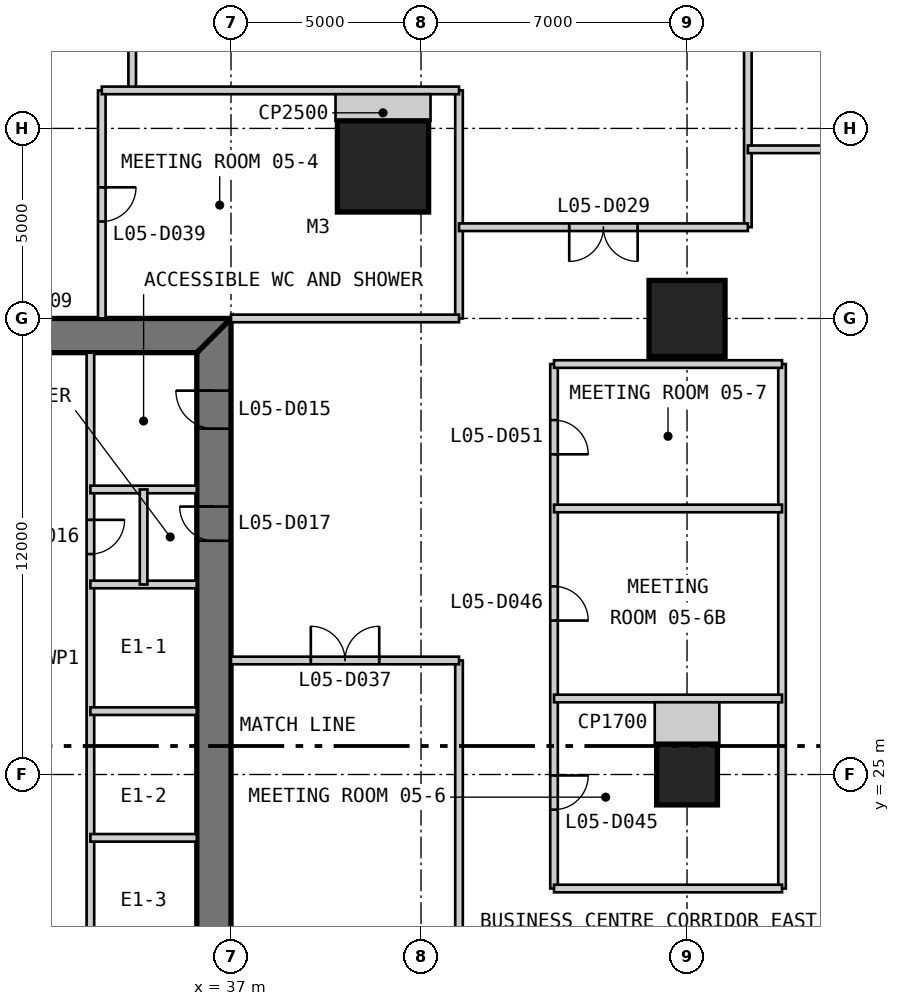
"""IFC4 building model, lengths in metres.
Left out: names, types, materials, properties, quantities, classifications, styles, units other than length and angle.
Written with IfcOpenShell. Run it as: python <this file> out.ifc"""

import sys

from ifc_helpers import new_model, si_unit, direction, frame, frame_2d, origin, origin_2d, place, context, subcontext, project, spatial, polyline, rectangle, outline, extrude, element, fill, save


model = new_model("IFC4")
c1 = context("Model", 3, precision=1e-05, world=origin(), true_north=direction((0.0, 1.0)))
c2 = subcontext(c1, "Body", "Model", "MODEL_VIEW")
j1 = project(units=[si_unit("LENGTHUNIT", "METRE"), si_unit("PLANEANGLEUNIT", "RADIAN")], contexts=[c1])
p1 = place(None, origin())
s1 = spatial("IfcSite", under=j1, at=p1, CompositionType="ELEMENT")
p2 = place(p1, origin())
s2 = spatial("IfcBuilding", under=s1, at=p2, CompositionType="ELEMENT")
p3 = place(p2, frame((0.0, 0.0, 26.2)))
s3 = spatial("IfcBuildingStorey", under=s2, at=p3, CompositionType="ELEMENT", Elevation=26.2)
p4 = place(p3, frame((41.0, 41.0, 0.0), z_axis=(0.0, 0.0, 1.0), x_axis=(1.0, 0.0, 0.0)))
e1 = element("IfcColumn", 1, at=p4, inside=s3, PredefinedType="COLUMN", context=c2, shape_type="SweptSolid", body=[
    extrude(rectangle(XDim=2.4, YDim=2.4, at=origin_2d()), origin(), (0.0, 0.0, 1.0), 4.8),
])
p5 = place(p3, frame((49.0, 25.0, 0.0), z_axis=(0.0, 0.0, 1.0), x_axis=(1.0, 0.0, 0.0)))
e2 = element("IfcColumn", 2, at=p5, inside=s3, PredefinedType="COLUMN", context=c2, shape_type="SweptSolid", body=[
    extrude(rectangle(XDim=1.6, YDim=1.6, at=origin_2d()), origin(), (0.0, 0.0, 1.0), 4.8),
])
p6 = place(p3, frame((49.0, 37.0, 0.0), z_axis=(0.0, 0.0, 1.0), x_axis=(1.0, 0.0, 0.0)))
e3 = element("IfcColumn", 3, at=p6, inside=s3, PredefinedType="COLUMN", context=c2, shape_type="SweptSolid", body=[
    extrude(rectangle(XDim=2.0, YDim=2.0, at=origin_2d()), origin(), (0.0, 0.0, 1.0), 4.8),
])
p7 = place(p3, frame((36.55, 13.9, 0.0), z_axis=(0.0, 0.0, 1.0), x_axis=(0.0, 1.0, 0.0)))
e4 = element("IfcWall", 4, at=p7, inside=s3, PredefinedType="SHEAR", context=c2, shape_type="SweptSolid", body=[
    extrude(outline(polyline([(-0.9, -0.45), (23.1, -0.45), (22.2, 0.45), (0.0, 0.45), (-0.9, -0.45)])), origin(), (0.0, 0.0, 1.0), 4.8),
])
p8 = place(p7, frame((20.2, 0.0, 0.0)))
e5 = element("IfcOpeningElement", 5, at=p8, cuts=e4, PredefinedType="OPENING", context=c2, shape_type="SweptSolid", body=[
    extrude(rectangle(XDim=1.0, YDim=2.2, at=frame_2d((0.5, 1.1))), frame((0.0, 0.46, 0.0), z_axis=(0.0, -1.0, 0.0), x_axis=(1.0, 0.0, 0.0)), (0.0, 0.0, 1.0), 0.92),
])
p9 = place(p7, frame((17.25, 0.0, 0.0)))
e6 = element("IfcOpeningElement", 6, at=p9, cuts=e4, PredefinedType="OPENING", context=c2, shape_type="SweptSolid", body=[
    extrude(rectangle(XDim=0.9, YDim=2.2, at=frame_2d((0.45, 1.1))), frame((0.0, 0.46, 0.0), z_axis=(0.0, -1.0, 0.0), x_axis=(1.0, 0.0, 0.0)), (0.0, 0.0, 1.0), 0.92),
])
p10 = place(p3, frame((37.0, 36.55, 0.0), z_axis=(0.0, 0.0, 1.0), x_axis=(-1.0, 0.0, 0.0)))
e7 = element("IfcWall", 7, at=p10, inside=s3, PredefinedType="SHEAR", context=c2, shape_type="SweptSolid", body=[
    extrude(outline(polyline([(0.0, -0.45), (24.0, -0.45), (23.1, 0.45), (0.9, 0.45), (0.0, -0.45)])), origin(), (0.0, 0.0, 1.0), 4.8),
])
p11 = place(p10, frame((4.9, 0.0, 0.0)))
e8 = element("IfcOpeningElement", 8, at=p11, cuts=e7, PredefinedType="OPENING", context=c2, shape_type="SweptSolid", body=[
    extrude(rectangle(XDim=1.0, YDim=2.2, at=frame_2d((0.5, 1.1))), frame((0.0, 0.46, 0.0), z_axis=(0.0, -1.0, 0.0), x_axis=(1.0, 0.0, 0.0)), (0.0, 0.0, 1.0), 0.92),
])
p12 = place(p10, frame((8.9, 0.0, 0.0)))
e9 = element("IfcOpeningElement", 9, at=p12, cuts=e7, PredefinedType="OPENING", context=c2, shape_type="SweptSolid", body=[
    extrude(rectangle(XDim=1.1, YDim=2.2, at=frame_2d((0.55, 1.1))), frame((0.0, 0.46, 0.0), z_axis=(0.0, -1.0, 0.0), x_axis=(1.0, 0.0, 0.0)), (0.0, 0.0, 1.0), 0.92),
])
p13 = place(p10, frame((15.05, 0.0, 0.0)))
e10 = element("IfcOpeningElement", 10, at=p13, cuts=e7, PredefinedType="OPENING", context=c2, shape_type="SweptSolid", body=[
    extrude(rectangle(XDim=0.9, YDim=2.2, at=frame_2d((0.45, 1.1))), frame((0.0, 0.46, 0.0), z_axis=(0.0, -1.0, 0.0), x_axis=(1.0, 0.0, 0.0)), (0.0, 0.0, 1.0), 0.92),
])
p14 = place(p10, frame((17.9, 0.0, 0.0)))
e11 = element("IfcOpeningElement", 11, at=p14, cuts=e7, PredefinedType="OPENING", context=c2, shape_type="SweptSolid", body=[
    extrude(rectangle(XDim=1.0, YDim=2.2, at=frame_2d((0.5, 1.1))), frame((0.0, 0.46, 0.0), z_axis=(0.0, -1.0, 0.0), x_axis=(1.0, 0.0, 0.0)), (0.0, 0.0, 1.0), 0.92),
])
p15 = place(p10, frame((21.4, 0.0, 0.0)))
e12 = element("IfcOpeningElement", 12, at=p15, cuts=e7, PredefinedType="OPENING", context=c2, shape_type="SweptSolid", body=[
    extrude(rectangle(XDim=1.0, YDim=2.2, at=frame_2d((0.5, 1.1))), frame((0.0, 0.46, 0.0), z_axis=(0.0, -1.0, 0.0), x_axis=(1.0, 0.0, 0.0)), (0.0, 0.0, 1.0), 0.92),
])
p16 = place(p3, frame((33.3, 36.1, 0.0), z_axis=(0.0, 0.0, 1.0), x_axis=(0.0, -1.0, 0.0)))
e13 = element("IfcWall", 13, at=p16, inside=s3, PredefinedType="PARTITIONING", context=c2, shape_type="SweptSolid", body=[
    extrude(rectangle(XDim=16.1, YDim=0.2, at=frame_2d((8.05, 0.0))), origin(), (0.0, 0.0, 1.0), 4.6),
])
p17 = place(p16, frame((4.4, 0.0, 0.0)))
e14 = element("IfcOpeningElement", 14, at=p17, cuts=e13, PredefinedType="OPENING", context=c2, shape_type="SweptSolid", body=[
    extrude(rectangle(XDim=0.9, YDim=2.2, at=frame_2d((0.45, 1.1))), frame((0.0, 0.11, 0.0), z_axis=(0.0, -1.0, 0.0), x_axis=(1.0, 0.0, 0.0)), (0.0, 0.0, 1.0), 0.22),
])
for number, where, z_axis, x_axis in (
    (15, (36.1, 30.0, 0.0), (0.0, 0.0, 1.0), (-1.0, 0.0, 0.0)),
    (16, (36.1, 26.667, 0.0), (0.0, 0.0, 1.0), (-1.0, 0.0, 0.0)),
    (17, (36.1, 23.333, 0.0), (0.0, 0.0, 1.0), (-1.0, 0.0, 0.0)),
    (18, (36.1, 32.5, 0.0), (0.0, 0.0, 1.0), (-1.0, 0.0, 0.0)),
):
    element("IfcWall", number, at=place(p3, frame(where, z_axis=z_axis, x_axis=x_axis)), inside=s3, PredefinedType="PARTITIONING", context=c2, shape_type="SweptSolid", body=[
        extrude(rectangle(XDim=2.8, YDim=0.2, at=frame_2d((1.4, 0.0))), origin(), (0.0, 0.0, 1.0), 4.6),
    ])
p18 = place(p3, frame((34.7, 32.5, 0.0), z_axis=(0.0, 0.0, 1.0), x_axis=(0.0, -1.0, 0.0)))
e19 = element("IfcWall", 19, at=p18, inside=s3, PredefinedType="PARTITIONING", context=c2, shape_type="SweptSolid", body=[
    extrude(rectangle(XDim=2.5, YDim=0.2, at=frame_2d((1.25, 0.0))), origin(), (0.0, 0.0, 1.0), 4.6),
])
p19 = place(p3, frame((33.6, 37.0, 0.0), z_axis=(0.0, 0.0, 1.0), x_axis=(0.0, 1.0, 0.0)))
e20 = element("IfcWall", 20, at=p19, inside=s3, PredefinedType="PARTITIONING", context=c2, shape_type="SweptSolid", body=[
    extrude(rectangle(XDim=6.0, YDim=0.2, at=frame_2d((3.0, 0.0))), origin(), (0.0, 0.0, 1.0), 4.5),
])
p20 = place(p19, frame((2.55, 0.0, 0.0)))
e21 = element("IfcOpeningElement", 21, at=p20, cuts=e20, PredefinedType="OPENING", context=c2, shape_type="SweptSolid", body=[
    extrude(rectangle(XDim=0.9, YDim=2.2, at=frame_2d((0.45, 1.1))), frame((0.0, 0.11, 0.0), z_axis=(0.0, -1.0, 0.0), x_axis=(1.0, 0.0, 0.0)), (0.0, 0.0, 1.0), 0.22),
])
p21 = place(p3, frame((34.4, 43.0, 0.0), z_axis=(0.0, 0.0, 1.0), x_axis=(0.0, 1.0, 0.0)))
e22 = element("IfcWall", 22, at=p21, inside=s3, PredefinedType="PARTITIONING", context=c2, shape_type="SweptSolid", body=[
    extrude(rectangle(XDim=22.25, YDim=0.2, at=frame_2d((11.125, 0.0))), origin(), (0.0, 0.0, 1.0), 4.5),
])
p22 = place(p21, frame((17.5, 0.0, 0.0)))
e23 = element("IfcOpeningElement", 23, at=p22, cuts=e22, PredefinedType="OPENING", context=c2, shape_type="SweptSolid", body=[
    extrude(rectangle(XDim=1.8, YDim=2.4, at=frame_2d((0.9, 1.2))), frame((0.0, 0.11, 0.0), z_axis=(0.0, -1.0, 0.0), x_axis=(1.0, 0.0, 0.0)), (0.0, 0.0, 1.0), 0.22),
])
p23 = place(p3, frame((43.0, -0.6, 0.0), z_axis=(0.0, 0.0, 1.0), x_axis=(0.0, 1.0, 0.0)))
e24 = element("IfcWall", 24, at=p23, inside=s3, PredefinedType="PARTITIONING", context=c2, shape_type="SweptSolid", body=[
    extrude(rectangle(XDim=28.6, YDim=0.2, at=frame_2d((14.3, 0.0))), origin(), (0.0, 0.0, 1.0), 3.893),
])
p24 = place(p3, frame((43.0, 37.0, 0.0), z_axis=(0.0, 0.0, 1.0), x_axis=(0.0, 1.0, 0.0)))
e25 = element("IfcWall", 25, at=p24, inside=s3, PredefinedType="PARTITIONING", context=c2, shape_type="SweptSolid", body=[
    extrude(rectangle(XDim=6.0, YDim=0.2, at=frame_2d((3.0, 0.0))), origin(), (0.0, 0.0, 1.0), 4.5),
])
p25 = place(p3, frame((45.5, 22.0, 0.0), z_axis=(0.0, 0.0, 1.0), x_axis=(0.0, 1.0, 0.0)))
e26 = element("IfcWall", 26, at=p25, inside=s3, PredefinedType="PARTITIONING", context=c2, shape_type="SweptSolid", body=[
    extrude(rectangle(XDim=13.8, YDim=0.2, at=frame_2d((6.9, 0.0))), origin(), (0.0, 0.0, 1.0), 4.5),
])
p26 = place(p25, frame((2.075, 0.0, 0.0)))
e27 = element("IfcOpeningElement", 27, at=p26, cuts=e26, PredefinedType="OPENING", context=c2, shape_type="SweptSolid", body=[
    extrude(rectangle(XDim=0.9, YDim=2.2, at=frame_2d((0.45, 1.1))), frame((0.0, 0.11, 0.0), z_axis=(0.0, -1.0, 0.0), x_axis=(1.0, 0.0, 0.0)), (0.0, 0.0, 1.0), 0.22),
])
p27 = place(p25, frame((7.05, 0.0, 0.0)))
e28 = element("IfcOpeningElement", 28, at=p27, cuts=e26, PredefinedType="OPENING", context=c2, shape_type="SweptSolid", body=[
    extrude(rectangle(XDim=0.9, YDim=2.2, at=frame_2d((0.45, 1.1))), frame((0.0, 0.11, 0.0), z_axis=(0.0, -1.0, 0.0), x_axis=(1.0, 0.0, 0.0)), (0.0, 0.0, 1.0), 0.22),
])
p28 = place(p25, frame((11.425, 0.0, 0.0)))
e29 = element("IfcOpeningElement", 29, at=p28, cuts=e26, PredefinedType="OPENING", context=c2, shape_type="SweptSolid", body=[
    extrude(rectangle(XDim=0.9, YDim=2.2, at=frame_2d((0.45, 1.1))), frame((0.0, 0.11, 0.0), z_axis=(0.0, -1.0, 0.0), x_axis=(1.0, 0.0, 0.0)), (0.0, 0.0, 1.0), 0.22),
])
p29 = place(p3, frame((50.6, 39.4, 0.0), z_axis=(0.0, 0.0, 1.0), x_axis=(0.0, 1.0, 0.0)))
e30 = element("IfcWall", 30, at=p29, inside=s3, PredefinedType="PARTITIONING", context=c2, shape_type="SweptSolid", body=[
    extrude(rectangle(XDim=25.85, YDim=0.2, at=frame_2d((12.925, 0.0))), origin(), (0.0, 0.0, 1.0), 4.5),
])
p30 = place(p3, frame((51.5, 22.0, 0.0), z_axis=(0.0, 0.0, 1.0), x_axis=(0.0, 1.0, 0.0)))
e31 = element("IfcWall", 31, at=p30, inside=s3, PredefinedType="PARTITIONING", context=c2, shape_type="SweptSolid", body=[
    extrude(rectangle(XDim=13.8, YDim=0.2, at=frame_2d((6.9, 0.0))), origin(), (0.0, 0.0, 1.0), 4.5),
])
for number, where, z_axis, x_axis in (
    (32, (45.5, 22.0, 0.0), (0.0, 0.0, 1.0), (1.0, 0.0, 0.0)),
    (33, (45.5, 27.0, 0.0), (0.0, 0.0, 1.0), (1.0, 0.0, 0.0)),
):
    element("IfcWall", number, at=place(p3, frame(where, z_axis=z_axis, x_axis=x_axis)), inside=s3, PredefinedType="PARTITIONING", context=c2, shape_type="SweptSolid", body=[
        extrude(rectangle(XDim=6.0, YDim=0.2, at=frame_2d((3.0, 0.0))), origin(), (0.0, 0.0, 1.0), 4.5),
    ])
p31 = place(p3, frame((37.0, 28.0, 0.0), z_axis=(0.0, 0.0, 1.0), x_axis=(1.0, 0.0, 0.0)))
e34 = element("IfcWall", 34, at=p31, inside=s3, PredefinedType="PARTITIONING", context=c2, shape_type="SweptSolid", body=[
    extrude(rectangle(XDim=6.0, YDim=0.2, at=frame_2d((3.0, 0.0))), origin(), (0.0, 0.0, 1.0), 4.5),
])
p32 = place(p31, frame((2.1, 0.0, 0.0)))
e35 = element("IfcOpeningElement", 35, at=p32, cuts=e34, PredefinedType="OPENING", context=c2, shape_type="SweptSolid", body=[
    extrude(rectangle(XDim=1.8, YDim=2.4, at=frame_2d((0.9, 1.2))), frame((0.0, 0.11, 0.0), z_axis=(0.0, -1.0, 0.0), x_axis=(1.0, 0.0, 0.0)), (0.0, 0.0, 1.0), 0.22),
])
for number, where, z_axis, x_axis in (
    (36, (45.5, 32.0, 0.0), (0.0, 0.0, 1.0), (1.0, 0.0, 0.0)),
    (37, (45.5, 35.8, 0.0), (0.0, 0.0, 1.0), (1.0, 0.0, 0.0)),
):
    element("IfcWall", number, at=place(p3, frame(where, z_axis=z_axis, x_axis=x_axis)), inside=s3, PredefinedType="PARTITIONING", context=c2, shape_type="SweptSolid", body=[
        extrude(rectangle(XDim=6.0, YDim=0.2, at=frame_2d((3.0, 0.0))), origin(), (0.0, 0.0, 1.0), 4.5),
    ])
p33 = place(p3, frame((37.0, 37.0, 0.0), z_axis=(0.0, 0.0, 1.0), x_axis=(1.0, 0.0, 0.0)))
e38 = element("IfcWall", 38, at=p33, inside=s3, PredefinedType="PARTITIONING", context=c2, shape_type="SweptSolid", body=[
    extrude(rectangle(XDim=6.0, YDim=0.2, at=frame_2d((3.0, 0.0))), origin(), (0.0, 0.0, 1.0), 3.703),
])
p34 = place(p3, frame((43.0, 39.4, 0.0), z_axis=(0.0, 0.0, 1.0), x_axis=(1.0, 0.0, 0.0)))
e39 = element("IfcWall", 39, at=p34, inside=s3, PredefinedType="PARTITIONING", context=c2, shape_type="SweptSolid", body=[
    extrude(rectangle(XDim=7.6, YDim=0.2, at=frame_2d((3.8, 0.0))), origin(), (0.0, 0.0, 1.0), 4.5),
])
p35 = place(p34, frame((2.9, 0.0, 0.0)))
e40 = element("IfcOpeningElement", 40, at=p35, cuts=e39, PredefinedType="OPENING", context=c2, shape_type="SweptSolid", body=[
    extrude(rectangle(XDim=1.8, YDim=2.4, at=frame_2d((0.9, 1.2))), frame((0.0, 0.11, 0.0), z_axis=(0.0, -1.0, 0.0), x_axis=(1.0, 0.0, 0.0)), (0.0, 0.0, 1.0), 0.22),
])
p36 = place(p3, frame((50.6, 41.45, 0.0), z_axis=(0.0, 0.0, 1.0), x_axis=(1.0, 0.0, 0.0)))
e41 = element("IfcWall", 41, at=p36, inside=s3, PredefinedType="PARTITIONING", context=c2, shape_type="SweptSolid", body=[
    extrude(rectangle(XDim=6.65, YDim=0.2, at=frame_2d((3.325, 0.0))), origin(), (0.0, 0.0, 1.0), 4.5),
])
p37 = place(p36, frame((2.425, 0.0, 0.0)))
e42 = element("IfcOpeningElement", 42, at=p37, cuts=e41, PredefinedType="OPENING", context=c2, shape_type="SweptSolid", body=[
    extrude(rectangle(XDim=1.8, YDim=2.4, at=frame_2d((0.9, 1.2))), frame((0.0, 0.11, 0.0), z_axis=(0.0, -1.0, 0.0), x_axis=(1.0, 0.0, 0.0)), (0.0, 0.0, 1.0), 0.22),
])
p38 = place(p3, frame((33.6, 43.0, 0.0), z_axis=(0.0, 0.0, 1.0), x_axis=(1.0, 0.0, 0.0)))
e43 = element("IfcWall", 43, at=p38, inside=s3, PredefinedType="PARTITIONING", context=c2, shape_type="SweptSolid", body=[
    extrude(rectangle(XDim=9.4, YDim=0.2, at=frame_2d((4.7, 0.0))), origin(), (0.0, 0.0, 1.0), 4.5),
])
p39 = place(p3, frame((41.0, 42.9, 0.0), z_axis=(0.0, 0.0, 1.0), x_axis=(0.0, -1.0, 0.0)))
e44 = element("IfcWall", 44, at=p39, inside=s3, PredefinedType="PARTITIONING", context=c2, shape_type="SweptSolid", body=[
    extrude(rectangle(XDim=0.7, YDim=2.5, at=frame_2d((0.35, 0.0))), origin(), (0.0, 0.0, 1.0), 4.5),
])
p40 = place(p3, frame((49.0, 26.9, 0.0), z_axis=(0.0, 0.0, 1.0), x_axis=(0.0, -1.0, 0.0)))
e45 = element("IfcWall", 45, at=p40, inside=s3, PredefinedType="PARTITIONING", context=c2, shape_type="SweptSolid", body=[
    extrude(rectangle(XDim=1.1, YDim=1.7, at=frame_2d((0.55, 0.0))), origin(), (0.0, 0.0, 1.0), 4.5),
])
p41 = place(p8, origin())
e46 = element("IfcDoor", 46, at=p41, inside=s3, OperationType="SINGLE_SWING_RIGHT", PredefinedType="DOOR", context=c2, shape_type="SweptSolid", body=[
    extrude(rectangle(XDim=1.0, YDim=2.2, at=frame_2d((0.5, 1.1))), frame((0.0, 0.025, 0.0), z_axis=(0.0, -1.0, 0.0), x_axis=(1.0, 0.0, 0.0)), (0.0, 0.0, 1.0), 0.05),
    extrude(outline(polyline([(0.0, 0.0), (0.04, 0.0), (0.04, 2.16), (0.96, 2.16), (0.96, 0.0), (1.0, 0.0), (1.0, 2.2), (0.0, 2.2), (0.0, 0.0)])), frame((0.0, 0.3, 0.0), z_axis=(0.0, -1.0, 0.0), x_axis=(1.0, 0.0, 0.0)), (0.0, 0.0, 1.0), 0.6),
])
fill(e5, e46)
p42 = place(p17, origin())
e47 = element("IfcDoor", 47, at=p42, inside=s3, OperationType="SINGLE_SWING_LEFT", PredefinedType="DOOR", context=c2, shape_type="SweptSolid", body=[
    extrude(rectangle(XDim=0.9, YDim=2.2, at=frame_2d((0.45, 1.1))), frame((0.0, 0.025, 0.0), z_axis=(0.0, -1.0, 0.0), x_axis=(1.0, 0.0, 0.0)), (0.0, 0.0, 1.0), 0.05),
])
fill(e14, e47)
p43 = place(p9, origin())
e48 = element("IfcDoor", 48, at=p43, inside=s3, OperationType="SINGLE_SWING_RIGHT", PredefinedType="DOOR", context=c2, shape_type="SweptSolid", body=[
    extrude(rectangle(XDim=0.9, YDim=2.2, at=frame_2d((0.45, 1.1))), frame((0.0, 0.025, 0.0), z_axis=(0.0, -1.0, 0.0), x_axis=(1.0, 0.0, 0.0)), (0.0, 0.0, 1.0), 0.05),
    extrude(outline(polyline([(0.0, 0.0), (0.04, 0.0), (0.04, 2.16), (0.86, 2.16), (0.86, 0.0), (0.9, 0.0), (0.9, 2.2), (0.0, 2.2), (0.0, 0.0)])), frame((0.0, 0.3, 0.0), z_axis=(0.0, -1.0, 0.0), x_axis=(1.0, 0.0, 0.0)), (0.0, 0.0, 1.0), 0.6),
])
fill(e6, e48)
p44 = place(p35, frame((1.8, 0.0, 0.0), z_axis=(0.0, 0.0, 1.0), x_axis=(-1.0, 0.0, 0.0)))
e49 = element("IfcDoor", 49, at=p44, inside=s3, OperationType="DOUBLE_DOOR_SINGLE_SWING", PredefinedType="DOOR", context=c2, shape_type="SweptSolid", body=[
    extrude(rectangle(XDim=1.8, YDim=2.4, at=frame_2d((0.9, 1.2))), frame((0.0, 0.025, 0.0), z_axis=(0.0, -1.0, 0.0), x_axis=(1.0, 0.0, 0.0)), (0.0, 0.0, 1.0), 0.05),
])
fill(e40, e49)
p45 = place(p32, origin())
e50 = element("IfcDoor", 50, at=p45, inside=s3, OperationType="DOUBLE_DOOR_SINGLE_SWING", PredefinedType="DOOR", context=c2, shape_type="SweptSolid", body=[
    extrude(rectangle(XDim=1.8, YDim=2.4, at=frame_2d((0.9, 1.2))), frame((0.0, 0.025, 0.0), z_axis=(0.0, -1.0, 0.0), x_axis=(1.0, 0.0, 0.0)), (0.0, 0.0, 1.0), 0.05),
])
fill(e35, e50)
p46 = place(p20, frame((0.9, 0.0, 0.0), z_axis=(0.0, 0.0, 1.0), x_axis=(-1.0, 0.0, 0.0)))
e51 = element("IfcDoor", 51, at=p46, inside=s3, OperationType="SINGLE_SWING_LEFT", PredefinedType="DOOR", context=c2, shape_type="SweptSolid", body=[
    extrude(rectangle(XDim=0.9, YDim=2.2, at=frame_2d((0.45, 1.1))), frame((0.0, 0.025, 0.0), z_axis=(0.0, -1.0, 0.0), x_axis=(1.0, 0.0, 0.0)), (0.0, 0.0, 1.0), 0.05),
])
fill(e21, e51)
p47 = place(p26, frame((0.9, 0.0, 0.0), z_axis=(0.0, 0.0, 1.0), x_axis=(-1.0, 0.0, 0.0)))
e52 = element("IfcDoor", 52, at=p47, inside=s3, OperationType="SINGLE_SWING_LEFT", PredefinedType="DOOR", context=c2, shape_type="SweptSolid", body=[
    extrude(rectangle(XDim=0.9, YDim=2.2, at=frame_2d((0.45, 1.1))), frame((0.0, 0.025, 0.0), z_axis=(0.0, -1.0, 0.0), x_axis=(1.0, 0.0, 0.0)), (0.0, 0.0, 1.0), 0.05),
])
fill(e27, e52)
p48 = place(p27, frame((0.9, 0.0, 0.0), z_axis=(0.0, 0.0, 1.0), x_axis=(-1.0, 0.0, 0.0)))
e53 = element("IfcDoor", 53, at=p48, inside=s3, OperationType="SINGLE_SWING_RIGHT", PredefinedType="DOOR", context=c2, shape_type="SweptSolid", body=[
    extrude(rectangle(XDim=0.9, YDim=2.2, at=frame_2d((0.45, 1.1))), frame((0.0, 0.025, 0.0), z_axis=(0.0, -1.0, 0.0), x_axis=(1.0, 0.0, 0.0)), (0.0, 0.0, 1.0), 0.05),
])
fill(e28, e53)
p49 = place(p28, frame((0.9, 0.0, 0.0), z_axis=(0.0, 0.0, 1.0), x_axis=(-1.0, 0.0, 0.0)))
e54 = element("IfcDoor", 54, at=p49, inside=s3, OperationType="SINGLE_SWING_RIGHT", PredefinedType="DOOR", context=c2, shape_type="SweptSolid", body=[
    extrude(rectangle(XDim=0.9, YDim=2.2, at=frame_2d((0.45, 1.1))), frame((0.0, 0.025, 0.0), z_axis=(0.0, -1.0, 0.0), x_axis=(1.0, 0.0, 0.0)), (0.0, 0.0, 1.0), 0.05),
])
fill(e29, e54)
save(model, sys.argv[1])
